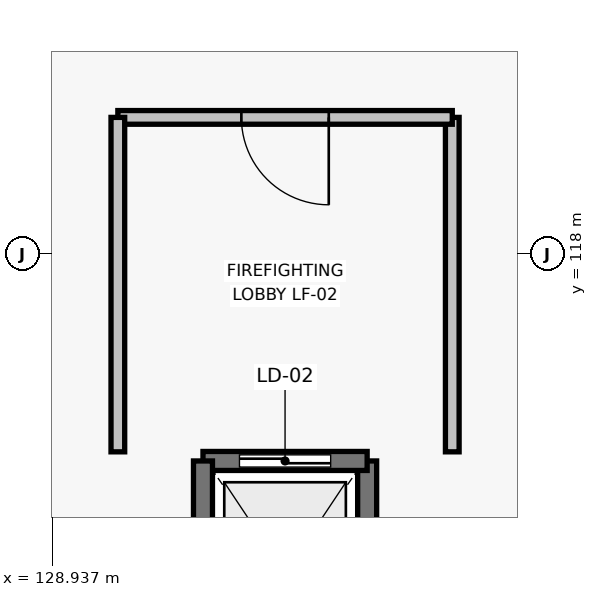
"""IFC4 building model, lengths in metres.
Left out: names, types, materials, properties, quantities, classifications, styles, units other than length and angle.
Written with IfcOpenShell. Run it as: python <this file> out.ifc"""

import sys

from ifc_helpers import new_model, si_unit, direction, frame, frame_2d, origin, place, context, subcontext, project, spatial, rectangle, extrude, element, fill, save


model = new_model("IFC4")
c1 = context("Model", 3, precision=1e-05, world=origin(), true_north=direction((0.0, 1.0)))
c2 = subcontext(c1, "Body", "Model", "MODEL_VIEW")
j1 = project(units=[si_unit("LENGTHUNIT", "METRE"), si_unit("PLANEANGLEUNIT", "RADIAN")], contexts=[c1])
p1 = place(None, origin())
s1 = spatial("IfcSite", under=j1, at=p1, CompositionType="ELEMENT")
p2 = place(p1, origin())
s2 = spatial("IfcBuilding", under=s1, at=p2, CompositionType="ELEMENT")
p3 = place(p2, frame((0.0, 0.0, 21.0)))
s3 = spatial("IfcBuildingStorey", under=s2, at=p3, CompositionType="ELEMENT", Elevation=21.0)
p4 = place(p3, frame((133.08, 112.32, 0.0), z_axis=(0.0, 0.0, 1.0), x_axis=(0.0, 1.0, 0.0)))
e1 = element("IfcWall", 1, at=p4, inside=s3, PredefinedType="SHEAR", context=c2, shape_type="SweptSolid", body=[
    extrude(rectangle(XDim=2.96, YDim=0.25, at=frame_2d((1.48, 0.0))), origin(), (0.0, 0.0, 1.0), 3.71),
])
p5 = place(p3, frame((133.08, 115.28, 0.0), z_axis=(0.0, 0.0, 1.0), x_axis=(-1.0, 0.0, 0.0)))
e2 = element("IfcWall", 2, at=p5, inside=s3, PredefinedType="SHEAR", context=c2, shape_type="SweptSolid", body=[
    extrude(rectangle(XDim=2.16, YDim=0.25, at=frame_2d((1.08, 0.0))), origin(), (0.0, 0.0, 1.0), 3.71),
])
p6 = place(p5, frame((0.48, 0.0, 0.0)))
e3 = element("IfcOpeningElement", 3, at=p6, cuts=e2, PredefinedType="OPENING", context=c2, shape_type="SweptSolid", body=[
    extrude(rectangle(XDim=1.2, YDim=2.2, at=frame_2d((0.6, 1.1))), frame((0.0, 0.135, 0.0), z_axis=(0.0, -1.0, 0.0), x_axis=(1.0, 0.0, 0.0)), (0.0, 0.0, 1.0), 0.27),
])
p7 = place(p3, frame((130.92, 115.28, 0.0), z_axis=(0.0, 0.0, 1.0), x_axis=(0.0, -1.0, 0.0)))
e4 = element("IfcWall", 4, at=p7, inside=s3, PredefinedType="SHEAR", context=c2, shape_type="SweptSolid", body=[
    extrude(rectangle(XDim=2.96, YDim=0.25, at=frame_2d((1.48, 0.0))), origin(), (0.0, 0.0, 1.0), 3.71),
])
p8 = place(p3, frame((134.2, 115.4, 0.0), z_axis=(0.0, 0.0, 1.0), x_axis=(0.0, 1.0, 0.0)))
e5 = element("IfcWall", 5, at=p8, inside=s3, PredefinedType="PARTITIONING", context=c2, shape_type="SweptSolid", body=[
    extrude(rectangle(XDim=4.4, YDim=0.18, at=frame_2d((2.2, 0.0))), origin(), (0.0, 0.0, 1.0), 3.375),
])
p9 = place(p3, frame((134.2, 119.8, 0.0), z_axis=(0.0, 0.0, 1.0), x_axis=(-1.0, 0.0, 0.0)))
e6 = element("IfcWall", 6, at=p9, inside=s3, PredefinedType="PARTITIONING", context=c2, shape_type="SweptSolid", body=[
    extrude(rectangle(XDim=4.4, YDim=0.18, at=frame_2d((2.2, 0.0))), origin(), (0.0, 0.0, 1.0), 3.71),
])
p10 = place(p9, frame((1.625, 0.0, 0.0)))
e7 = element("IfcOpeningElement", 7, at=p10, cuts=e6, PredefinedType="OPENING", context=c2, shape_type="SweptSolid", body=[
    extrude(rectangle(XDim=1.15, YDim=2.2, at=frame_2d((0.575, 1.1))), frame((0.0, 0.1, 0.0), z_axis=(0.0, -1.0, 0.0), x_axis=(1.0, 0.0, 0.0)), (0.0, 0.0, 1.0), 0.2),
])
p11 = place(p3, frame((129.8, 119.8, 0.0), z_axis=(0.0, 0.0, 1.0), x_axis=(0.0, -1.0, 0.0)))
e8 = element("IfcWall", 8, at=p11, inside=s3, PredefinedType="PARTITIONING", context=c2, shape_type="SweptSolid", body=[
    extrude(rectangle(XDim=4.4, YDim=0.18, at=frame_2d((2.2, 0.0))), origin(), (0.0, 0.0, 1.0), 3.71),
])
p12 = place(p6, origin())
e9 = element("IfcDoor", 9, at=p12, inside=s3, OperationType="SLIDING_TO_RIGHT", PredefinedType="DOOR", context=c2, shape_type="SweptSolid", body=[
    extrude(rectangle(XDim=1.2, YDim=2.2, at=frame_2d((0.6, 1.1))), frame((0.0, 0.025, 0.0), z_axis=(0.0, -1.0, 0.0), x_axis=(1.0, 0.0, 0.0)), (0.0, 0.0, 1.0), 0.05),
])
fill(e3, e9)
p13 = place(p10, origin())
e10 = element("IfcDoor", 10, at=p13, inside=s3, OperationType="SINGLE_SWING_LEFT", PredefinedType="DOOR", context=c2, shape_type="SweptSolid", body=[
    extrude(rectangle(XDim=1.15, YDim=2.2, at=frame_2d((0.575, 1.1))), frame((0.0, 0.025, 0.0), z_axis=(0.0, -1.0, 0.0), x_axis=(1.0, 0.0, 0.0)), (0.0, 0.0, 1.0), 0.05),
])
fill(e7, e10)
save(model, sys.argv[1])
